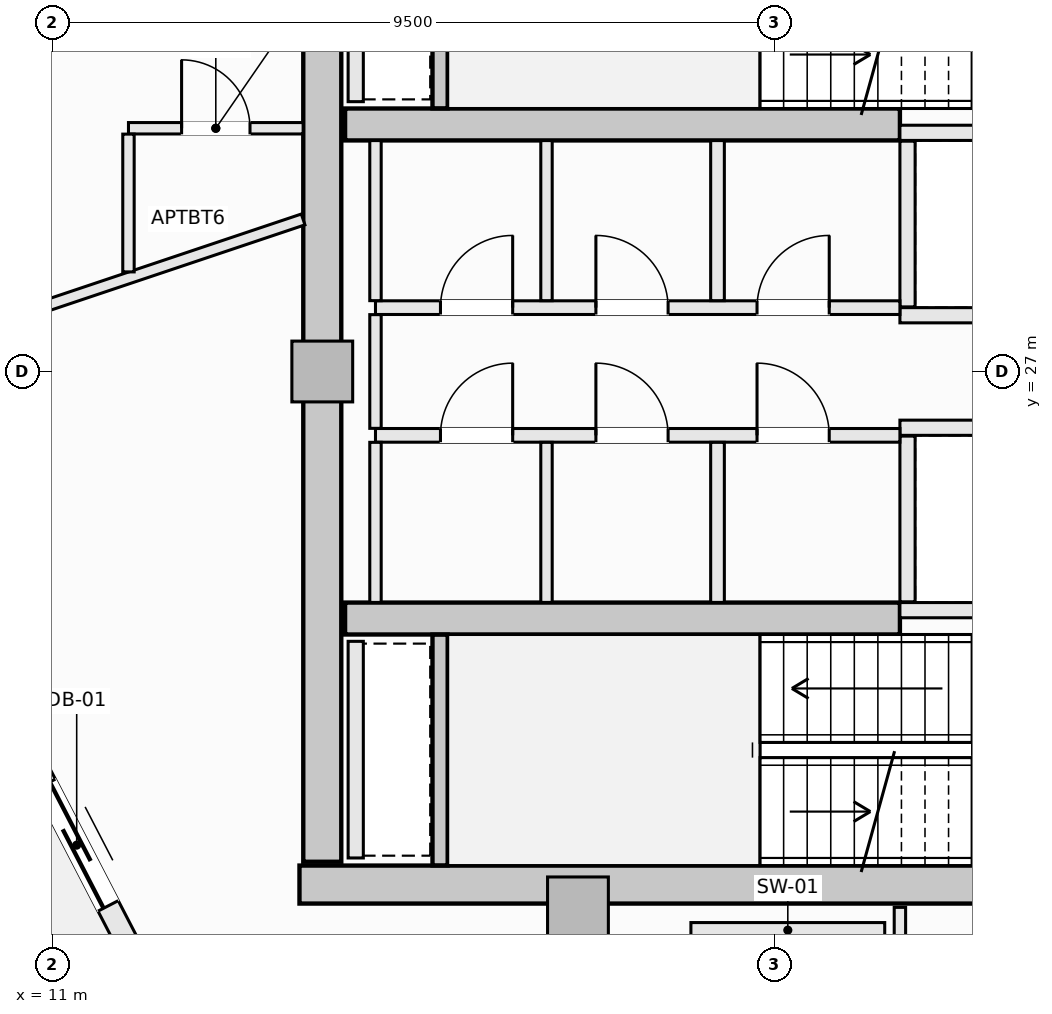
"""IFC4 building model, lengths in metres.
Left out: names, types, materials, properties, quantities, classifications, styles, units other than length and angle.
Written with IfcOpenShell. Run it as: python <this file> out.ifc"""

import sys

from ifc_helpers import new_model, si_unit, direction, frame, frame_2d, origin, origin_2d, place, context, subcontext, project, spatial, rectangle, extrude, element, fill, save


model = new_model("IFC4")
c1 = context("Model", 3, precision=1e-05, world=origin(), true_north=direction((0.0, 1.0)))
c2 = subcontext(c1, "Body", "Model", "MODEL_VIEW")
j1 = project(units=[si_unit("LENGTHUNIT", "METRE"), si_unit("PLANEANGLEUNIT", "RADIAN")], contexts=[c1])
p1 = place(None, origin())
s1 = spatial("IfcSite", under=j1, at=p1, CompositionType="ELEMENT")
p2 = place(p1, origin())
s2 = spatial("IfcBuilding", under=s1, at=p2, CompositionType="ELEMENT")
p3 = place(p2, frame((0.0, 0.0, 272.3)))
s3 = spatial("IfcBuildingStorey", under=s2, at=p3, CompositionType="ELEMENT", Elevation=272.3)
p4 = place(p3, frame((14.25, 20.25, -0.27), z_axis=(0.0, 0.0, 1.0), x_axis=(1.0, 0.0, 0.0)))
e1 = element("IfcWall", 1, at=p4, inside=s3, PredefinedType="SHEAR", context=c2, shape_type="SweptSolid", body=[
    extrude(rectangle(XDim=13.5, YDim=0.5, at=frame_2d((6.75, 0.0))), origin(), (0.0, 0.0, 1.0), 3.25),
])
p5 = place(p3, frame((14.55, 20.55, -0.27), z_axis=(0.0, 0.0, 1.0), x_axis=(0.0, 1.0, 0.0)))
e2 = element("IfcWall", 2, at=p5, inside=s3, PredefinedType="SHEAR", context=c2, shape_type="SweptSolid", body=[
    extrude(rectangle(XDim=12.9, YDim=0.5, at=frame_2d((6.45, 0.0))), origin(), (0.0, 0.0, 1.0), 3.25),
])
for number, where, z_axis, x_axis in (
    (3, (14.85, 30.25, -0.27), (0.0, 0.0, 1.0), (1.0, 0.0, 0.0)),
    (4, (14.85, 23.75, -0.27), (0.0, 0.0, 1.0), (1.0, 0.0, 0.0)),
):
    element("IfcWall", number, at=place(p3, frame(where, z_axis=z_axis, x_axis=x_axis)), inside=s3, PredefinedType="SHEAR", context=c2, shape_type="SweptSolid", body=[
        extrude(rectangle(XDim=7.3, YDim=0.42, at=frame_2d((3.65, 0.0))), origin(), (0.0, 0.0, 1.0), 3.25),
    ])
for number, where, z_axis, x_axis in (
    (5, (14.55, 27.0, -0.27), (0.0, 0.0, 1.0), (1.0, 0.0, 0.0)),
    (6, (17.914, 19.95, -0.27), (0.0, 0.0, 1.0), (1.0, 0.0, 0.0)),
):
    element("IfcColumn", number, at=place(p3, frame(where, z_axis=z_axis, x_axis=x_axis)), inside=s3, PredefinedType="PILASTER", context=c2, shape_type="SweptSolid", body=[
        extrude(rectangle(XDim=0.8, YDim=0.8, at=origin_2d()), origin(), (0.0, 0.0, 1.0), 3.25),
    ])
p6 = place(p3, frame((10.293, 31.251, 0.0), z_axis=(0.0, 0.0, 1.0), x_axis=(0.459801070243, 0.888021945564, 0.0)))
e7 = element("IfcWall", 7, at=p6, inside=s3, PredefinedType="SOLIDWALL", context=c2, shape_type="SweptSolid", body=[
    extrude(rectangle(XDim=4.461, YDim=0.3, at=frame_2d((2.23, 0.0))), origin(), (0.0, 0.0, 1.0), 2.555),
])
p7 = place(p6, frame((1.13, 0.0, 0.72)))
e8 = element("IfcOpeningElement", 8, at=p7, cuts=e7, PredefinedType="OPENING", context=c2, shape_type="SweptSolid", body=[
    extrude(rectangle(XDim=2.2, YDim=1.65, at=frame_2d((1.1, 0.825))), frame((0.0, 0.16, 0.0), z_axis=(0.0, -1.0, 0.0), x_axis=(1.0, 0.0, 0.0)), (0.0, 0.0, 1.0), 0.32),
])
p8 = place(p3, frame((10.293, 22.749, 0.0), z_axis=(0.0, 0.0, 1.0), x_axis=(0.459801070243, -0.888021945564, 0.0)))
e9 = element("IfcWall", 9, at=p8, inside=s3, PredefinedType="SOLIDWALL", context=c2, shape_type="SweptSolid", body=[
    extrude(rectangle(XDim=4.461, YDim=0.3, at=frame_2d((2.23, 0.0))), origin(), (0.0, 0.0, 1.0), 2.555),
])
p9 = place(p8, frame((1.33, 0.0, 0.0)))
e10 = element("IfcOpeningElement", 10, at=p9, cuts=e9, PredefinedType="OPENING", context=c2, shape_type="SweptSolid", body=[
    extrude(rectangle(XDim=1.8, YDim=2.25, at=frame_2d((0.9, 1.125))), frame((0.0, 0.16, 0.0), z_axis=(0.0, -1.0, 0.0), x_axis=(1.0, 0.0, 0.0)), (0.0, 0.0, 1.0), 0.32),
])
for number, where, z_axis, x_axis in (
    (11, (16.1, 30.462, -0.27), (0.0, 0.0, 1.0), (0.0, 1.0, 0.0)),
    (12, (16.1, 20.502, -0.27), (0.0, 0.0, 1.0), (0.0, 1.0, 0.0)),
):
    element("IfcWall", number, at=place(p3, frame(where, z_axis=z_axis, x_axis=x_axis)), inside=s3, PredefinedType="SHEAR", context=c2, shape_type="SweptSolid", body=[
        extrude(rectangle(XDim=3.036, YDim=0.2, at=frame_2d((1.518, 0.0))), origin(), (0.0, 0.0, 1.0), 3.25),
    ])
for number, where, z_axis, x_axis in (
    (13, (22.15, 30.14, 0.0), (0.0, 0.0, 1.0), (1.0, 0.0, 0.0)),
    (14, (22.15, 27.74, 0.0), (0.0, 0.0, 1.0), (1.0, 0.0, 0.0)),
):
    element("IfcWall", number, at=place(p3, frame(where, z_axis=z_axis, x_axis=x_axis)), inside=s3, PredefinedType="SOLIDWALL", context=c2, shape_type="SweptSolid", body=[
        extrude(rectangle(XDim=2.45, YDim=0.2, at=frame_2d((1.225, 0.0))), origin(), (0.0, 0.0, 1.0), 2.98),
    ])
p10 = place(p3, frame((22.25, 27.85, 0.0), z_axis=(0.0, 0.0, 1.0), x_axis=(0.0, 1.0, 0.0)))
e15 = element("IfcWall", 15, at=p10, inside=s3, PredefinedType="SOLIDWALL", context=c2, shape_type="SweptSolid", body=[
    extrude(rectangle(XDim=2.18, YDim=0.2, at=frame_2d((1.09, 0.0))), origin(), (0.0, 0.0, 1.0), 2.98),
])
for number, where, z_axis, x_axis in (
    (16, (22.15, 26.26, 0.0), (0.0, 0.0, 1.0), (1.0, 0.0, 0.0)),
    (17, (22.15, 23.86, 0.0), (0.0, 0.0, 1.0), (1.0, 0.0, 0.0)),
):
    element("IfcWall", number, at=place(p3, frame(where, z_axis=z_axis, x_axis=x_axis)), inside=s3, PredefinedType="SOLIDWALL", context=c2, shape_type="SweptSolid", body=[
        extrude(rectangle(XDim=2.45, YDim=0.2, at=frame_2d((1.225, 0.0))), origin(), (0.0, 0.0, 1.0), 2.98),
    ])
p11 = place(p3, frame((22.25, 23.97, 0.0), z_axis=(0.0, 0.0, 1.0), x_axis=(0.0, 1.0, 0.0)))
e18 = element("IfcWall", 18, at=p11, inside=s3, PredefinedType="SOLIDWALL", context=c2, shape_type="SweptSolid", body=[
    extrude(rectangle(XDim=2.18, YDim=0.2, at=frame_2d((1.09, 0.0))), origin(), (0.0, 0.0, 1.0), 2.98),
])
p12 = place(p3, frame((19.4, 19.65, 0.0), z_axis=(0.0, 0.0, 1.0), x_axis=(1.0, 0.0, 0.0)))
e19 = element("IfcWall", 19, at=p12, inside=s3, PredefinedType="SOLIDWALL", context=c2, shape_type="SweptSolid", body=[
    extrude(rectangle(XDim=2.55, YDim=0.2, at=frame_2d((1.275, 0.0))), origin(), (0.0, 0.0, 1.0), 2.98),
])
for number, where, z_axis, x_axis in (
    (20, (14.99, 30.55, 0.0), (0.0, 0.0, 1.0), (0.0, 1.0, 0.0)),
    (21, (14.99, 20.6, 0.0), (0.0, 0.0, 1.0), (0.0, 1.0, 0.0)),
):
    element("IfcWall", number, at=place(p3, frame(where, z_axis=z_axis, x_axis=x_axis)), inside=s3, PredefinedType="SOLIDWALL", context=c2, shape_type="SweptSolid", body=[
        extrude(rectangle(XDim=2.85, YDim=0.2, at=frame_2d((1.425, 0.0))), origin(), (0.0, 0.0, 1.0), 2.98),
    ])
p13 = place(p3, frame((15.25, 27.84, 0.0), z_axis=(0.0, 0.0, 1.0), x_axis=(1.0, 0.0, 0.0)))
e22 = element("IfcWall", 22, at=p13, inside=s3, PredefinedType="SOLIDWALL", context=c2, shape_type="SweptSolid", body=[
    extrude(rectangle(XDim=6.9, YDim=0.18, at=frame_2d((3.45, 0.0))), origin(), (0.0, 0.0, 1.0), 2.98),
])
p14 = place(p13, frame((5.02, 0.0, 0.0)))
e23 = element("IfcOpeningElement", 23, at=p14, cuts=e22, PredefinedType="OPENING", context=c2, shape_type="SweptSolid", body=[
    extrude(rectangle(XDim=0.95, YDim=2.1, at=frame_2d((0.475, 1.05))), frame((0.0, 0.1, 0.0), z_axis=(0.0, -1.0, 0.0), x_axis=(1.0, 0.0, 0.0)), (0.0, 0.0, 1.0), 0.2),
])
p15 = place(p13, frame((0.855, 0.0, 0.0)))
e24 = element("IfcOpeningElement", 24, at=p15, cuts=e22, PredefinedType="OPENING", context=c2, shape_type="SweptSolid", body=[
    extrude(rectangle(XDim=0.95, YDim=2.1, at=frame_2d((0.475, 1.05))), frame((0.0, 0.1, 0.0), z_axis=(0.0, -1.0, 0.0), x_axis=(1.0, 0.0, 0.0)), (0.0, 0.0, 1.0), 0.2),
])
p16 = place(p13, frame((2.9, 0.0, 0.0)))
e25 = element("IfcOpeningElement", 25, at=p16, cuts=e22, PredefinedType="OPENING", context=c2, shape_type="SweptSolid", body=[
    extrude(rectangle(XDim=0.95, YDim=2.1, at=frame_2d((0.475, 1.05))), frame((0.0, 0.1, 0.0), z_axis=(0.0, -1.0, 0.0), x_axis=(1.0, 0.0, 0.0)), (0.0, 0.0, 1.0), 0.2),
])
p17 = place(p3, frame((15.25, 26.16, 0.0), z_axis=(0.0, 0.0, 1.0), x_axis=(1.0, 0.0, 0.0)))
e26 = element("IfcWall", 26, at=p17, inside=s3, PredefinedType="SOLIDWALL", context=c2, shape_type="SweptSolid", body=[
    extrude(rectangle(XDim=6.9, YDim=0.18, at=frame_2d((3.45, 0.0))), origin(), (0.0, 0.0, 1.0), 2.98),
])
p18 = place(p17, frame((5.02, 0.0, 0.0)))
e27 = element("IfcOpeningElement", 27, at=p18, cuts=e26, PredefinedType="OPENING", context=c2, shape_type="SweptSolid", body=[
    extrude(rectangle(XDim=0.95, YDim=2.1, at=frame_2d((0.475, 1.05))), frame((0.0, 0.1, 0.0), z_axis=(0.0, -1.0, 0.0), x_axis=(1.0, 0.0, 0.0)), (0.0, 0.0, 1.0), 0.2),
])
p19 = place(p17, frame((0.855, 0.0, 0.0)))
e28 = element("IfcOpeningElement", 28, at=p19, cuts=e26, PredefinedType="OPENING", context=c2, shape_type="SweptSolid", body=[
    extrude(rectangle(XDim=0.95, YDim=2.1, at=frame_2d((0.475, 1.05))), frame((0.0, 0.1, 0.0), z_axis=(0.0, -1.0, 0.0), x_axis=(1.0, 0.0, 0.0)), (0.0, 0.0, 1.0), 0.2),
])
p20 = place(p17, frame((2.9, 0.0, 0.0)))
e29 = element("IfcOpeningElement", 29, at=p20, cuts=e26, PredefinedType="OPENING", context=c2, shape_type="SweptSolid", body=[
    extrude(rectangle(XDim=0.95, YDim=2.1, at=frame_2d((0.475, 1.05))), frame((0.0, 0.1, 0.0), z_axis=(0.0, -1.0, 0.0), x_axis=(1.0, 0.0, 0.0)), (0.0, 0.0, 1.0), 0.2),
])
p21 = place(p3, frame((15.25, 23.962, 0.0), z_axis=(0.0, 0.0, 1.0), x_axis=(0.0, 1.0, 0.0)))
e30 = element("IfcWall", 30, at=p21, inside=s3, PredefinedType="PARTITIONING", context=c2, shape_type="SweptSolid", body=[
    extrude(rectangle(XDim=2.106, YDim=0.15, at=frame_2d((1.053, 0.0))), origin(), (0.0, 0.0, 1.0), 2.98),
])
p22 = place(p3, frame((15.25, 26.252, 0.0), z_axis=(0.0, 0.0, 1.0), x_axis=(0.0, 1.0, 0.0)))
e31 = element("IfcWall", 31, at=p22, inside=s3, PredefinedType="PARTITIONING", context=c2, shape_type="SweptSolid", body=[
    extrude(rectangle(XDim=1.496, YDim=0.15, at=frame_2d((0.748, 0.0))), origin(), (0.0, 0.0, 1.0), 2.98),
])
p23 = place(p3, frame((15.25, 27.932, 0.0), z_axis=(0.0, 0.0, 1.0), x_axis=(0.0, 1.0, 0.0)))
e32 = element("IfcWall", 32, at=p23, inside=s3, PredefinedType="PARTITIONING", context=c2, shape_type="SweptSolid", body=[
    extrude(rectangle(XDim=2.106, YDim=0.15, at=frame_2d((1.053, 0.0))), origin(), (0.0, 0.0, 1.0), 2.98),
])
for number, where, z_axis, x_axis in (
    (33, (19.75, 23.962, 0.0), (0.0, 0.0, 1.0), (0.0, 1.0, 0.0)),
    (34, (19.75, 27.932, 0.0), (0.0, 0.0, 1.0), (0.0, 1.0, 0.0)),
):
    element("IfcWall", number, at=place(p3, frame(where, z_axis=z_axis, x_axis=x_axis)), inside=s3, PredefinedType="SOLIDWALL", context=c2, shape_type="SweptSolid", body=[
        extrude(rectangle(XDim=2.106, YDim=0.18, at=frame_2d((1.053, 0.0))), origin(), (0.0, 0.0, 1.0), 2.98),
    ])
p24 = place(p3, frame((12.0, 30.2, 0.0), z_axis=(0.0, 0.0, 1.0), x_axis=(1.0, 0.0, 0.0)))
e35 = element("IfcWall", 35, at=p24, inside=s3, PredefinedType="PARTITIONING", context=c2, shape_type="SweptSolid", body=[
    extrude(rectangle(XDim=2.298, YDim=0.15, at=frame_2d((1.149, 0.0))), origin(), (0.0, 0.0, 1.0), 2.98),
])
p25 = place(p24, frame((0.699, 0.0, 0.0)))
e36 = element("IfcOpeningElement", 36, at=p25, cuts=e35, PredefinedType="OPENING", context=c2, shape_type="SweptSolid", body=[
    extrude(rectangle(XDim=0.9, YDim=2.1, at=frame_2d((0.45, 1.05))), frame((0.0, 0.085, 0.0), z_axis=(0.0, -1.0, 0.0), x_axis=(1.0, 0.0, 0.0)), (0.0, 0.0, 1.0), 0.17),
])
for number, where, z_axis, x_axis in (
    (37, (17.5, 23.962, 0.0), (0.0, 0.0, 1.0), (0.0, 1.0, 0.0)),
    (38, (17.5, 27.932, 0.0), (0.0, 0.0, 1.0), (0.0, 1.0, 0.0)),
):
    element("IfcWall", number, at=place(p3, frame(where, z_axis=z_axis, x_axis=x_axis)), inside=s3, PredefinedType="PARTITIONING", context=c2, shape_type="SweptSolid", body=[
        extrude(rectangle(XDim=2.106, YDim=0.15, at=frame_2d((1.053, 0.0))), origin(), (0.0, 0.0, 1.0), 2.98),
    ])
p26 = place(p3, frame((22.15, 17.142, 0.0), z_axis=(0.0, 0.0, 1.0), x_axis=(0.0, 1.0, 0.0)))
e39 = element("IfcWall", 39, at=p26, inside=s3, PredefinedType="PARTITIONING", context=c2, shape_type="SweptSolid", body=[
    extrude(rectangle(XDim=2.808, YDim=0.15, at=frame_2d((1.404, 0.0))), origin(), (0.0, 0.0, 1.0), 2.98),
])
p27 = place(p3, frame((9.83, 27.501, 0.0), z_axis=(0.0, 0.0, 1.0), x_axis=(0.948028536058, 0.318185315217, 0.0)))
e40 = element("IfcWall", 40, at=p27, inside=s3, PredefinedType="PARTITIONING", context=c2, shape_type="SweptSolid", body=[
    extrude(rectangle(XDim=4.713, YDim=0.15, at=frame_2d((2.356, 0.0))), origin(), (0.0, 0.0, 1.0), 2.98),
])
p28 = place(p3, frame((12.0, 28.31, 0.0), z_axis=(0.0, 0.0, 1.0), x_axis=(0.0, 1.0, 0.0)))
e41 = element("IfcWall", 41, at=p28, inside=s3, PredefinedType="PARTITIONING", context=c2, shape_type="SweptSolid", body=[
    extrude(rectangle(XDim=1.813, YDim=0.15, at=frame_2d((0.906, 0.0))), origin(), (0.0, 0.0, 1.0), 2.98),
])
p29 = place(p9, frame((1.8, 0.0, 0.0), z_axis=(0.0, 0.0, 1.0), x_axis=(-1.0, 0.0, 0.0)))
e42 = element("IfcDoor", 42, at=p29, inside=s3, OperationType="SLIDING_TO_LEFT", PredefinedType="DOOR", context=c2, shape_type="SweptSolid", body=[
    extrude(rectangle(XDim=1.8, YDim=2.25, at=frame_2d((0.9, 1.125))), frame((0.0, 0.025, 0.0), z_axis=(0.0, -1.0, 0.0), x_axis=(1.0, 0.0, 0.0)), (0.0, 0.0, 1.0), 0.05),
])
fill(e10, e42)
p30 = place(p14, origin())
e43 = element("IfcDoor", 43, at=p30, inside=s3, OperationType="SINGLE_SWING_RIGHT", PredefinedType="DOOR", context=c2, shape_type="SweptSolid", body=[
    extrude(rectangle(XDim=0.95, YDim=2.1, at=frame_2d((0.475, 1.05))), frame((0.0, 0.025, 0.0), z_axis=(0.0, -1.0, 0.0), x_axis=(1.0, 0.0, 0.0)), (0.0, 0.0, 1.0), 0.05),
])
fill(e23, e43)
p31 = place(p18, origin())
e44 = element("IfcDoor", 44, at=p31, inside=s3, OperationType="SINGLE_SWING_LEFT", PredefinedType="DOOR", context=c2, shape_type="SweptSolid", body=[
    extrude(rectangle(XDim=0.95, YDim=2.1, at=frame_2d((0.475, 1.05))), frame((0.0, 0.025, 0.0), z_axis=(0.0, -1.0, 0.0), x_axis=(1.0, 0.0, 0.0)), (0.0, 0.0, 1.0), 0.05),
])
fill(e27, e44)
p32 = place(p15, origin())
e45 = element("IfcDoor", 45, at=p32, inside=s3, OperationType="SINGLE_SWING_RIGHT", PredefinedType="DOOR", context=c2, shape_type="SweptSolid", body=[
    extrude(rectangle(XDim=0.95, YDim=2.1, at=frame_2d((0.475, 1.05))), frame((0.0, 0.025, 0.0), z_axis=(0.0, -1.0, 0.0), x_axis=(1.0, 0.0, 0.0)), (0.0, 0.0, 1.0), 0.05),
])
fill(e24, e45)
p33 = place(p16, origin())
e46 = element("IfcDoor", 46, at=p33, inside=s3, OperationType="SINGLE_SWING_LEFT", PredefinedType="DOOR", context=c2, shape_type="SweptSolid", body=[
    extrude(rectangle(XDim=0.95, YDim=2.1, at=frame_2d((0.475, 1.05))), frame((0.0, 0.025, 0.0), z_axis=(0.0, -1.0, 0.0), x_axis=(1.0, 0.0, 0.0)), (0.0, 0.0, 1.0), 0.05),
])
fill(e25, e46)
p34 = place(p19, origin())
e47 = element("IfcDoor", 47, at=p34, inside=s3, OperationType="SINGLE_SWING_RIGHT", PredefinedType="DOOR", context=c2, shape_type="SweptSolid", body=[
    extrude(rectangle(XDim=0.95, YDim=2.1, at=frame_2d((0.475, 1.05))), frame((0.0, 0.025, 0.0), z_axis=(0.0, -1.0, 0.0), x_axis=(1.0, 0.0, 0.0)), (0.0, 0.0, 1.0), 0.05),
])
fill(e28, e47)
p35 = place(p20, origin())
e48 = element("IfcDoor", 48, at=p35, inside=s3, OperationType="SINGLE_SWING_LEFT", PredefinedType="DOOR", context=c2, shape_type="SweptSolid", body=[
    extrude(rectangle(XDim=0.95, YDim=2.1, at=frame_2d((0.475, 1.05))), frame((0.0, 0.025, 0.0), z_axis=(0.0, -1.0, 0.0), x_axis=(1.0, 0.0, 0.0)), (0.0, 0.0, 1.0), 0.05),
])
fill(e29, e48)
p36 = place(p25, origin())
e49 = element("IfcDoor", 49, at=p36, inside=s3, OperationType="SINGLE_SWING_LEFT", PredefinedType="DOOR", context=c2, shape_type="SweptSolid", body=[
    extrude(rectangle(XDim=0.9, YDim=2.1, at=frame_2d((0.45, 1.05))), frame((0.0, 0.025, 0.0), z_axis=(0.0, -1.0, 0.0), x_axis=(1.0, 0.0, 0.0)), (0.0, 0.0, 1.0), 0.05),
])
fill(e36, e49)
save(model, sys.argv[1])
